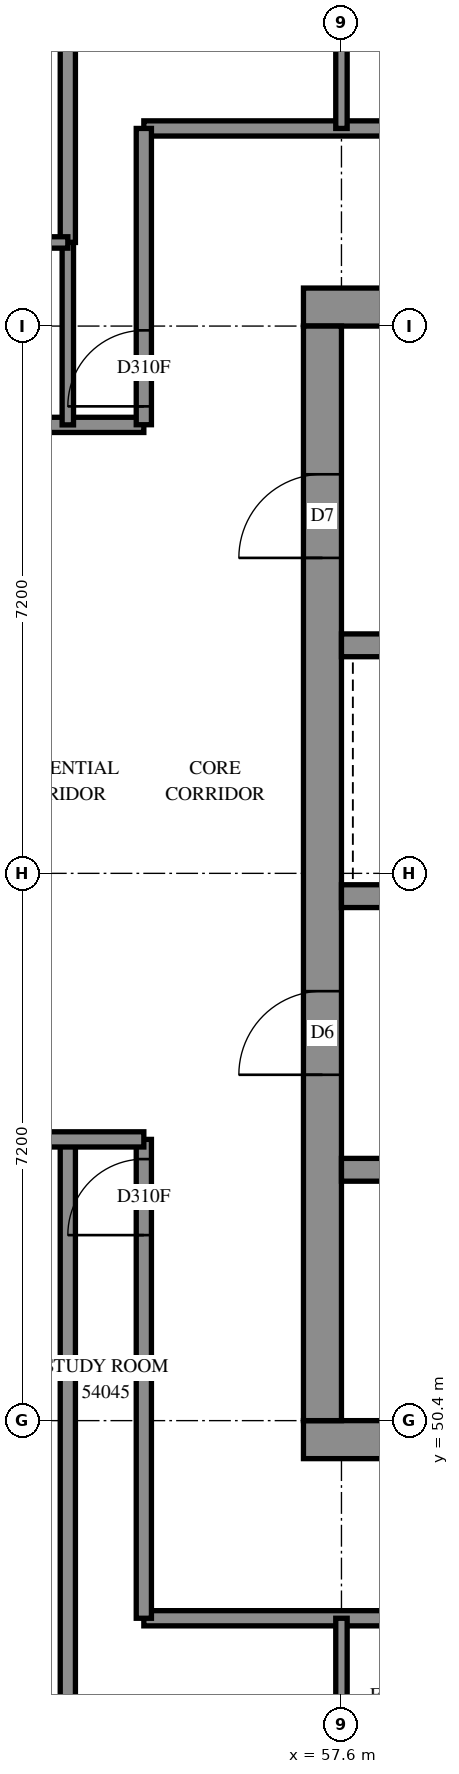
"""IFC4 building model, lengths in metres.
Left out: names, types, materials, properties, quantities, classifications, styles, units other than length and angle.
Written with IfcOpenShell. Run it as: python <this file> out.ifc"""

import sys

from ifc_helpers import new_model, si_unit, direction, frame, frame_2d, origin, place, context, subcontext, project, spatial, rectangle, extrude, element, fill, save


model = new_model("IFC4")
c1 = context("Model", 3, precision=1e-05, world=origin(), true_north=direction((0.0, 1.0)))
c2 = subcontext(c1, "Body", "Model", "MODEL_VIEW")
j1 = project(units=[si_unit("LENGTHUNIT", "METRE"), si_unit("PLANEANGLEUNIT", "RADIAN")], contexts=[c1])
p1 = place(None, origin())
s1 = spatial("IfcSite", under=j1, at=p1, CompositionType="ELEMENT")
p2 = place(p1, origin())
s2 = spatial("IfcBuilding", under=s1, at=p2, CompositionType="ELEMENT")
p3 = place(p2, frame((0.0, 0.0, 199.8)))
s3 = spatial("IfcBuildingStorey", under=s2, at=p3, CompositionType="ELEMENT", Elevation=199.8)
p4 = place(p3, frame((57.1, 50.15, -0.3), z_axis=(0.0, 0.0, 1.0), x_axis=(1.0, 0.0, 0.0)))
e1 = element("IfcWall", 1, at=p4, inside=s3, PredefinedType="SHEAR", context=c2, shape_type="SweptSolid", body=[
    extrude(rectangle(XDim=15.4, YDim=0.5, at=frame_2d((7.7, 0.0))), origin(), (0.0, 0.0, 1.0), 2.7),
])
p5 = place(p3, frame((57.1, 65.05, -0.3), z_axis=(0.0, 0.0, 1.0), x_axis=(1.0, 0.0, 0.0)))
e2 = element("IfcWall", 2, at=p5, inside=s3, PredefinedType="SHEAR", context=c2, shape_type="SweptSolid", body=[
    extrude(rectangle(XDim=15.4, YDim=0.5, at=frame_2d((7.7, 0.0))), origin(), (0.0, 0.0, 1.0), 2.7),
])
p6 = place(p5, frame((10.5, 0.0, 0.3)))
e3 = element("IfcOpeningElement", 3, at=p6, cuts=e2, PredefinedType="OPENING", context=c2, shape_type="SweptSolid", body=[
    extrude(rectangle(XDim=0.8, YDim=2.1, at=frame_2d((0.4, 1.05))), frame((0.0, 0.26, 0.0), z_axis=(0.0, -1.0, 0.0), x_axis=(1.0, 0.0, 0.0)), (0.0, 0.0, 1.0), 0.52),
])
p7 = place(p3, frame((57.35, 50.4, -0.3), z_axis=(0.0, 0.0, 1.0), x_axis=(0.0, 1.0, 0.0)))
e4 = element("IfcWall", 4, at=p7, inside=s3, PredefinedType="SHEAR", context=c2, shape_type="SweptSolid", body=[
    extrude(rectangle(XDim=14.4, YDim=0.5, at=frame_2d((7.2, 0.0))), origin(), (0.0, 0.0, 1.0), 2.7),
])
p8 = place(p7, frame((4.55, 0.0, 0.3)))
e5 = element("IfcOpeningElement", 5, at=p8, cuts=e4, PredefinedType="OPENING", context=c2, shape_type="SweptSolid", body=[
    extrude(rectangle(XDim=1.1, YDim=2.1, at=frame_2d((0.55, 1.05))), frame((0.0, 0.26, 0.0), z_axis=(0.0, -1.0, 0.0), x_axis=(1.0, 0.0, 0.0)), (0.0, 0.0, 1.0), 0.52),
])
p9 = place(p7, frame((11.35, 0.0, 0.3)))
e6 = element("IfcOpeningElement", 6, at=p9, cuts=e4, PredefinedType="OPENING", context=c2, shape_type="SweptSolid", body=[
    extrude(rectangle(XDim=1.1, YDim=2.1, at=frame_2d((0.55, 1.05))), frame((0.0, 0.26, 0.0), z_axis=(0.0, -1.0, 0.0), x_axis=(1.0, 0.0, 0.0)), (0.0, 0.0, 1.0), 0.52),
])
p10 = place(p3, frame((57.6, 53.7, 0.0), z_axis=(0.0, 0.0, 1.0), x_axis=(1.0, 0.0, 0.0)))
e7 = element("IfcWall", 7, at=p10, inside=s3, PredefinedType="SOLIDWALL", context=c2, shape_type="SweptSolid", body=[
    extrude(rectangle(XDim=14.4, YDim=0.3, at=frame_2d((7.2, 0.0))), origin(), (0.0, 0.0, 1.0), 3.1),
])
p11 = place(p10, frame((1.35, 0.0, 0.0)))
e8 = element("IfcOpeningElement", 8, at=p11, cuts=e7, PredefinedType="OPENING", context=c2, shape_type="SweptSolid", body=[
    extrude(rectangle(XDim=0.9, YDim=2.1, at=frame_2d((0.45, 1.05))), frame((0.0, 0.16, 0.0), z_axis=(0.0, -1.0, 0.0), x_axis=(1.0, 0.0, 0.0)), (0.0, 0.0, 1.0), 0.32),
])
p12 = place(p10, frame((4.95, 0.0, 0.0)))
e9 = element("IfcOpeningElement", 9, at=p12, cuts=e7, PredefinedType="OPENING", context=c2, shape_type="SweptSolid", body=[
    extrude(rectangle(XDim=0.9, YDim=2.1, at=frame_2d((0.45, 1.05))), frame((0.0, 0.16, 0.0), z_axis=(0.0, -1.0, 0.0), x_axis=(1.0, 0.0, 0.0)), (0.0, 0.0, 1.0), 0.32),
])
p13 = place(p10, frame((8.55, 0.0, 0.0)))
e10 = element("IfcOpeningElement", 10, at=p13, cuts=e7, PredefinedType="OPENING", context=c2, shape_type="SweptSolid", body=[
    extrude(rectangle(XDim=0.9, YDim=2.1, at=frame_2d((0.45, 1.05))), frame((0.0, 0.16, 0.0), z_axis=(0.0, -1.0, 0.0), x_axis=(1.0, 0.0, 0.0)), (0.0, 0.0, 1.0), 0.32),
])
p14 = place(p10, frame((12.05, 0.0, 0.0)))
e11 = element("IfcOpeningElement", 11, at=p14, cuts=e7, PredefinedType="OPENING", context=c2, shape_type="SweptSolid", body=[
    extrude(rectangle(XDim=1.1, YDim=2.1, at=frame_2d((0.55, 1.05))), frame((0.0, 0.16, 0.0), z_axis=(0.0, -1.0, 0.0), x_axis=(1.0, 0.0, 0.0)), (0.0, 0.0, 1.0), 0.32),
])
p15 = place(p3, frame((57.6, 57.3, 0.0), z_axis=(0.0, 0.0, 1.0), x_axis=(1.0, 0.0, 0.0)))
e12 = element("IfcWall", 12, at=p15, inside=s3, PredefinedType="SOLIDWALL", context=c2, shape_type="SweptSolid", body=[
    extrude(rectangle(XDim=14.4, YDim=0.3, at=frame_2d((7.2, 0.0))), origin(), (0.0, 0.0, 1.0), 3.1),
])
p16 = place(p15, frame((1.25, 0.0, 0.0)))
e13 = element("IfcOpeningElement", 13, at=p16, cuts=e12, PredefinedType="OPENING", context=c2, shape_type="SweptSolid", body=[
    extrude(rectangle(XDim=1.1, YDim=2.1, at=frame_2d((0.55, 1.05))), frame((0.0, 0.16, 0.0), z_axis=(0.0, -1.0, 0.0), x_axis=(1.0, 0.0, 0.0)), (0.0, 0.0, 1.0), 0.32),
])
p17 = place(p15, frame((4.85, 0.0, 0.0)))
e14 = element("IfcOpeningElement", 14, at=p17, cuts=e12, PredefinedType="OPENING", context=c2, shape_type="SweptSolid", body=[
    extrude(rectangle(XDim=1.1, YDim=2.1, at=frame_2d((0.55, 1.05))), frame((0.0, 0.16, 0.0), z_axis=(0.0, -1.0, 0.0), x_axis=(1.0, 0.0, 0.0)), (0.0, 0.0, 1.0), 0.32),
])
p18 = place(p15, frame((8.45, 0.0, 0.0)))
e15 = element("IfcOpeningElement", 15, at=p18, cuts=e12, PredefinedType="OPENING", context=c2, shape_type="SweptSolid", body=[
    extrude(rectangle(XDim=1.1, YDim=2.1, at=frame_2d((0.55, 1.05))), frame((0.0, 0.16, 0.0), z_axis=(0.0, -1.0, 0.0), x_axis=(1.0, 0.0, 0.0)), (0.0, 0.0, 1.0), 0.32),
])
p19 = place(p15, frame((12.05, 0.0, 0.0)))
e16 = element("IfcOpeningElement", 16, at=p19, cuts=e12, PredefinedType="OPENING", context=c2, shape_type="SweptSolid", body=[
    extrude(rectangle(XDim=1.1, YDim=2.1, at=frame_2d((0.55, 1.05))), frame((0.0, 0.16, 0.0), z_axis=(0.0, -1.0, 0.0), x_axis=(1.0, 0.0, 0.0)), (0.0, 0.0, 1.0), 0.32),
])
p20 = place(p3, frame((57.6, 60.6, 0.0), z_axis=(0.0, 0.0, 1.0), x_axis=(1.0, 0.0, 0.0)))
e17 = element("IfcWall", 17, at=p20, inside=s3, PredefinedType="SOLIDWALL", context=c2, shape_type="SweptSolid", body=[
    extrude(rectangle(XDim=7.2, YDim=0.3, at=frame_2d((3.6, 0.0))), origin(), (0.0, 0.0, 1.0), 3.1),
])
p21 = place(p3, frame((55.0, 67.4, 0.0), z_axis=(0.0, 0.0, 1.0), x_axis=(1.0, 0.0, 0.0)))
e18 = element("IfcWall", 18, at=p21, inside=s3, PredefinedType="PARTITIONING", context=c2, shape_type="SweptSolid", body=[
    extrude(rectangle(XDim=19.6, YDim=0.2, at=frame_2d((9.8, 0.0))), origin(), (0.0, 0.0, 1.0), 3.1),
])
p22 = place(p21, frame((6.499, 0.0, 0.0)))
e19 = element("IfcOpeningElement", 19, at=p22, cuts=e18, PredefinedType="OPENING", context=c2, shape_type="SweptSolid", body=[
    extrude(rectangle(XDim=0.9, YDim=2.1, at=frame_2d((0.45, 1.05))), frame((0.0, 0.11, 0.0), z_axis=(0.0, -1.0, 0.0), x_axis=(1.0, 0.0, 0.0)), (0.0, 0.0, 1.0), 0.22),
])
p23 = place(p21, frame((14.001, 0.0, 0.0)))
e20 = element("IfcOpeningElement", 20, at=p23, cuts=e18, PredefinedType="OPENING", context=c2, shape_type="SweptSolid", body=[
    extrude(rectangle(XDim=0.9, YDim=2.1, at=frame_2d((0.45, 1.05))), frame((0.0, 0.11, 0.0), z_axis=(0.0, -1.0, 0.0), x_axis=(1.0, 0.0, 0.0)), (0.0, 0.0, 1.0), 0.22),
])
p24 = place(p3, frame((55.0, 47.8, 0.0), z_axis=(0.0, 0.0, 1.0), x_axis=(1.0, 0.0, 0.0)))
e21 = element("IfcWall", 21, at=p24, inside=s3, PredefinedType="PARTITIONING", context=c2, shape_type="SweptSolid", body=[
    extrude(rectangle(XDim=19.266, YDim=0.2, at=frame_2d((9.633, 0.0))), origin(), (0.0, 0.0, 1.0), 3.1),
])
p25 = place(p24, frame((4.9, 0.0, 0.0)))
e22 = element("IfcOpeningElement", 22, at=p25, cuts=e21, PredefinedType="OPENING", context=c2, shape_type="SweptSolid", body=[
    extrude(rectangle(XDim=0.9, YDim=2.1, at=frame_2d((0.45, 1.05))), frame((0.0, 0.11, 0.0), z_axis=(0.0, -1.0, 0.0), x_axis=(1.0, 0.0, 0.0)), (0.0, 0.0, 1.0), 0.22),
])
p26 = place(p24, frame((6.6, 0.0, 0.0)))
e23 = element("IfcOpeningElement", 23, at=p26, cuts=e21, PredefinedType="OPENING", context=c2, shape_type="SweptSolid", body=[
    extrude(rectangle(XDim=0.9, YDim=2.1, at=frame_2d((0.45, 1.05))), frame((0.0, 0.11, 0.0), z_axis=(0.0, -1.0, 0.0), x_axis=(1.0, 0.0, 0.0)), (0.0, 0.0, 1.0), 0.22),
])
p27 = place(p24, frame((13.743, 0.0, 0.0)))
e24 = element("IfcOpeningElement", 24, at=p27, cuts=e21, PredefinedType="OPENING", context=c2, shape_type="SweptSolid", body=[
    extrude(rectangle(XDim=0.9, YDim=2.1, at=frame_2d((0.45, 1.05))), frame((0.0, 0.11, 0.0), z_axis=(0.0, -1.0, 0.0), x_axis=(1.0, 0.0, 0.0)), (0.0, 0.0, 1.0), 0.22),
])
p28 = place(p3, frame((40.702, 63.5, 0.0), z_axis=(0.0, 0.0, 1.0), x_axis=(1.0, 0.0, 0.0)))
e25 = element("IfcWall", 25, at=p28, inside=s3, PredefinedType="PARTITIONING", context=c2, shape_type="SweptSolid", body=[
    extrude(rectangle(XDim=14.298, YDim=0.2, at=frame_2d((7.149, 0.0))), origin(), (0.0, 0.0, 1.0), 3.1),
])
p29 = place(p28, frame((6.332, 0.0, 0.0)))
e26 = element("IfcOpeningElement", 26, at=p29, cuts=e25, PredefinedType="OPENING", context=c2, shape_type="SweptSolid", body=[
    extrude(rectangle(XDim=0.9, YDim=2.1, at=frame_2d((0.45, 1.05))), frame((0.0, 0.11, 0.0), z_axis=(0.0, -1.0, 0.0), x_axis=(1.0, 0.0, 0.0)), (0.0, 0.0, 1.0), 0.22),
])
p30 = place(p28, frame((10.098, 0.0, 0.0)))
e27 = element("IfcOpeningElement", 27, at=p30, cuts=e25, PredefinedType="OPENING", context=c2, shape_type="SweptSolid", body=[
    extrude(rectangle(XDim=0.9, YDim=2.1, at=frame_2d((0.45, 1.05))), frame((0.0, 0.11, 0.0), z_axis=(0.0, -1.0, 0.0), x_axis=(1.0, 0.0, 0.0)), (0.0, 0.0, 1.0), 0.22),
])
p31 = place(p3, frame((54.0, 42.372, 0.0), z_axis=(0.0, 0.0, 1.0), x_axis=(0.0, 1.0, 0.0)))
e28 = element("IfcWall", 28, at=p31, inside=s3, PredefinedType="PARTITIONING", context=c2, shape_type="SweptSolid", body=[
    extrude(rectangle(XDim=11.728, YDim=0.2, at=frame_2d((5.864, 0.0))), origin(), (0.0, 0.0, 1.0), 3.1),
])
p32 = place(p3, frame((54.0, 65.9, 0.0), z_axis=(0.0, 0.0, 1.0), x_axis=(0.0, 1.0, 0.0)))
e29 = element("IfcWall", 29, at=p32, inside=s3, PredefinedType="PARTITIONING", context=c2, shape_type="SweptSolid", body=[
    extrude(rectangle(XDim=6.843, YDim=0.2, at=frame_2d((3.422, 0.0))), origin(), (0.0, 0.0, 1.0), 3.1),
])
p33 = place(p3, frame((55.0, 47.8, 0.0), z_axis=(0.0, 0.0, 1.0), x_axis=(0.0, 1.0, 0.0)))
e30 = element("IfcWall", 30, at=p33, inside=s3, PredefinedType="PARTITIONING", context=c2, shape_type="SweptSolid", body=[
    extrude(rectangle(XDim=6.3, YDim=0.2, at=frame_2d((3.15, 0.0))), origin(), (0.0, 0.0, 1.0), 3.1),
])
p34 = place(p33, frame((5.041, 0.0, 0.0)))
e31 = element("IfcOpeningElement", 31, at=p34, cuts=e30, PredefinedType="OPENING", context=c2, shape_type="SweptSolid", body=[
    extrude(rectangle(XDim=1.0, YDim=2.1, at=frame_2d((0.5, 1.05))), frame((0.0, 0.11, 0.0), z_axis=(0.0, -1.0, 0.0), x_axis=(1.0, 0.0, 0.0)), (0.0, 0.0, 1.0), 0.22),
])
p35 = place(p3, frame((50.4, 54.1, 0.0), z_axis=(0.0, 0.0, 1.0), x_axis=(1.0, 0.0, 0.0)))
e32 = element("IfcWall", 32, at=p35, inside=s3, PredefinedType="PARTITIONING", context=c2, shape_type="SweptSolid", body=[
    extrude(rectangle(XDim=4.6, YDim=0.2, at=frame_2d((2.3, 0.0))), origin(), (0.0, 0.0, 1.0), 3.1),
])
p36 = place(p35, frame((2.3, 0.0, 0.0)))
e33 = element("IfcOpeningElement", 33, at=p36, cuts=e32, PredefinedType="OPENING", context=c2, shape_type="SweptSolid", body=[
    extrude(rectangle(XDim=0.9, YDim=2.1, at=frame_2d((0.45, 1.05))), frame((0.0, 0.11, 0.0), z_axis=(0.0, -1.0, 0.0), x_axis=(1.0, 0.0, 0.0)), (0.0, 0.0, 1.0), 0.22),
])
p37 = place(p3, frame((55.0, 63.502, 0.0), z_axis=(0.0, 0.0, 1.0), x_axis=(0.0, 1.0, 0.0)))
e34 = element("IfcWall", 34, at=p37, inside=s3, PredefinedType="PARTITIONING", context=c2, shape_type="SweptSolid", body=[
    extrude(rectangle(XDim=3.898, YDim=0.2, at=frame_2d((1.949, 0.0))), origin(), (0.0, 0.0, 1.0), 3.1),
])
p38 = place(p37, frame((0.242, 0.0, 0.0)))
e35 = element("IfcOpeningElement", 35, at=p38, cuts=e34, PredefinedType="OPENING", context=c2, shape_type="SweptSolid", body=[
    extrude(rectangle(XDim=1.0, YDim=2.1, at=frame_2d((0.5, 1.05))), frame((0.0, 0.11, 0.0), z_axis=(0.0, -1.0, 0.0), x_axis=(1.0, 0.0, 0.0)), (0.0, 0.0, 1.0), 0.22),
])
for number, where, z_axis, x_axis in (
    (36, (54.0, 63.5, 0.0), (0.0, 0.0, 1.0), (0.0, 1.0, 0.0)),
    (37, (57.6, 45.4, 0.0), (0.0, 0.0, 1.0), (0.0, 1.0, 0.0)),
    (38, (57.6, 67.4, 0.0), (0.0, 0.0, 1.0), (0.0, 1.0, 0.0)),
):
    element("IfcWall", number, at=place(p3, frame(where, z_axis=z_axis, x_axis=x_axis)), inside=s3, PredefinedType="PARTITIONING", context=c2, shape_type="SweptSolid", body=[
        extrude(rectangle(XDim=2.4, YDim=0.15, at=frame_2d((1.2, 0.0))), origin(), (0.0, 0.0, 1.0), 3.1),
    ])
p39 = place(p3, frame((52.1, 65.9, 0.0), z_axis=(0.0, 0.0, 1.0), x_axis=(1.0, 0.0, 0.0)))
e39 = element("IfcWall", 39, at=p39, inside=s3, PredefinedType="PARTITIONING", context=c2, shape_type="SweptSolid", body=[
    extrude(rectangle(XDim=1.9, YDim=0.15, at=frame_2d((0.95, 0.0))), origin(), (0.0, 0.0, 1.0), 3.1),
])
p40 = place(p39, frame((0.493, 0.0, 0.0)))
e40 = element("IfcOpeningElement", 40, at=p40, cuts=e39, PredefinedType="OPENING", context=c2, shape_type="SweptSolid", body=[
    extrude(rectangle(XDim=0.8, YDim=2.1, at=frame_2d((0.4, 1.05))), frame((0.0, 0.085, 0.0), z_axis=(0.0, -1.0, 0.0), x_axis=(1.0, 0.0, 0.0)), (0.0, 0.0, 1.0), 0.17),
])
p41 = place(p8, origin())
e41 = element("IfcDoor", 41, at=p41, inside=s3, OperationType="DOUBLE_DOOR_SINGLE_SWING", PredefinedType="DOOR", context=c2, shape_type="SweptSolid", body=[
    extrude(rectangle(XDim=1.1, YDim=2.1, at=frame_2d((0.55, 1.05))), frame((0.0, 0.025, 0.0), z_axis=(0.0, -1.0, 0.0), x_axis=(1.0, 0.0, 0.0)), (0.0, 0.0, 1.0), 0.05),
])
fill(e5, e41)
p42 = place(p9, origin())
e42 = element("IfcDoor", 42, at=p42, inside=s3, OperationType="SINGLE_SWING_LEFT", PredefinedType="DOOR", context=c2, shape_type="SweptSolid", body=[
    extrude(rectangle(XDim=1.1, YDim=2.1, at=frame_2d((0.55, 1.05))), frame((0.0, 0.025, 0.0), z_axis=(0.0, -1.0, 0.0), x_axis=(1.0, 0.0, 0.0)), (0.0, 0.0, 1.0), 0.05),
])
fill(e6, e42)
p43 = place(p38, origin())
e43 = element("IfcDoor", 43, at=p43, inside=s3, OperationType="SINGLE_SWING_LEFT", PredefinedType="DOOR", context=c2, shape_type="SweptSolid", body=[
    extrude(rectangle(XDim=1.0, YDim=2.1, at=frame_2d((0.5, 1.05))), frame((0.0, 0.025, 0.0), z_axis=(0.0, -1.0, 0.0), x_axis=(1.0, 0.0, 0.0)), (0.0, 0.0, 1.0), 0.05),
])
fill(e35, e43)
p44 = place(p34, origin())
e44 = element("IfcDoor", 44, at=p44, inside=s3, OperationType="SINGLE_SWING_RIGHT", PredefinedType="DOOR", context=c2, shape_type="SweptSolid", body=[
    extrude(rectangle(XDim=1.0, YDim=2.1, at=frame_2d((0.5, 1.05))), frame((0.0, 0.025, 0.0), z_axis=(0.0, -1.0, 0.0), x_axis=(1.0, 0.0, 0.0)), (0.0, 0.0, 1.0), 0.05),
])
fill(e31, e44)
save(model, sys.argv[1])
